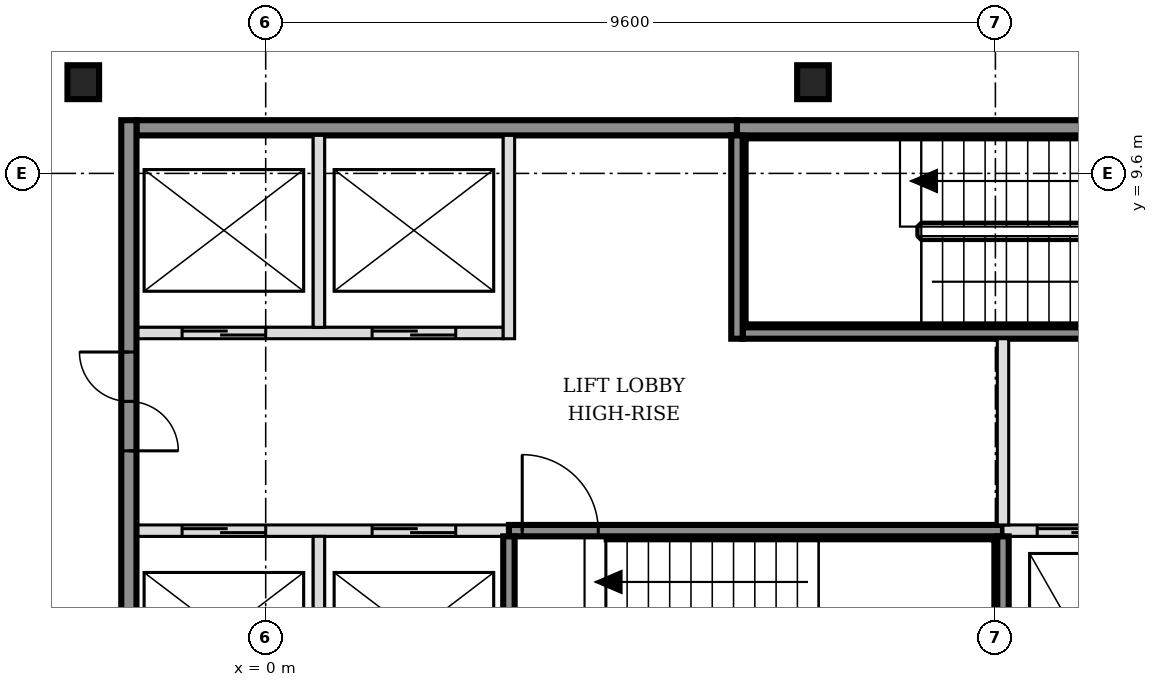
"""IFC4 building model, lengths in metres.
Left out: names, types, materials, properties, quantities, classifications, styles, units other than length and angle.
Written with IfcOpenShell. Run it as: python <this file> out.ifc"""

import sys

from ifc_helpers import new_model, si_unit, direction, frame, frame_2d, origin, origin_2d, place, context, subcontext, project, spatial, rectangle, i_section, extrude, element, fill, save


model = new_model("IFC4")
c1 = context("Model", 3, precision=1e-05, world=origin(), true_north=direction((0.0, 1.0)))
c2 = subcontext(c1, "Body", "Model", "MODEL_VIEW")
j1 = project(units=[si_unit("LENGTHUNIT", "METRE"), si_unit("PLANEANGLEUNIT", "RADIAN")], contexts=[c1])
p1 = place(None, origin())
s1 = spatial("IfcSite", under=j1, at=p1, CompositionType="ELEMENT")
p2 = place(p1, origin())
s2 = spatial("IfcBuilding", under=s1, at=p2, CompositionType="ELEMENT")
p3 = place(p2, frame((0.0, 0.0, 186.6)))
s3 = spatial("IfcBuildingStorey", under=s2, at=p3, CompositionType="ELEMENT", Elevation=186.6)
for number, where, z_axis, x_axis in (
    (1, (-2.4, 10.8, -0.15), (0.0, 0.0, 1.0), (1.0, 0.0, 0.0)),
    (2, (7.2, 10.8, -0.15), (0.0, 0.0, 1.0), (1.0, 0.0, 0.0)),
):
    element("IfcColumn", number, at=place(p3, frame(where, z_axis=z_axis, x_axis=x_axis)), inside=s3, PredefinedType="COLUMN", context=c2, shape_type="SweptSolid", body=[
        extrude(i_section(OverallWidth=0.416, OverallDepth=0.446, WebThickness=0.039, FlangeThickness=0.063, FilletRadius=0.015, at=origin_2d()), origin(), (0.0, 0.0, 1.0), 3.6),
    ])
p4 = place(p3, frame((-1.7, 4.9, 0.0), z_axis=(0.0, 0.0, 1.0), x_axis=(1.0, 0.0, 0.0)))
e3 = element("IfcWall", 3, at=p4, inside=s3, PredefinedType="SOLIDWALL", context=c2, shape_type="SweptSolid", body=[
    extrude(rectangle(XDim=4.9, YDim=0.15, at=frame_2d((2.45, 0.0))), origin(), (0.0, 0.0, 1.0), 3.45),
])
p5 = place(p4, frame((0.6, 0.0, 0.0)))
e4 = element("IfcOpeningElement", 4, at=p5, cuts=e3, PredefinedType="OPENING", context=c2, shape_type="SweptSolid", body=[
    extrude(rectangle(XDim=1.1, YDim=2.1, at=frame_2d((0.55, 1.05))), frame((0.0, 0.085, 0.0), z_axis=(0.0, -1.0, 0.0), x_axis=(1.0, 0.0, 0.0)), (0.0, 0.0, 1.0), 0.17),
])
p6 = place(p4, frame((3.1, 0.0, 0.0)))
e5 = element("IfcOpeningElement", 5, at=p6, cuts=e3, PredefinedType="OPENING", context=c2, shape_type="SweptSolid", body=[
    extrude(rectangle(XDim=1.1, YDim=2.1, at=frame_2d((0.55, 1.05))), frame((0.0, 0.085, 0.0), z_axis=(0.0, -1.0, 0.0), x_axis=(1.0, 0.0, 0.0)), (0.0, 0.0, 1.0), 0.17),
])
p7 = place(p3, frame((3.2, 4.9, 0.0), z_axis=(0.0, 0.0, 1.0), x_axis=(1.0, 0.0, 0.0)))
e6 = element("IfcWall", 6, at=p7, inside=s3, PredefinedType="SOLIDWALL", context=c2, shape_type="SweptSolid", body=[
    extrude(rectangle(XDim=6.5, YDim=0.15, at=frame_2d((3.25, 0.0))), origin(), (0.0, 0.0, 1.0), 3.45),
])
p8 = place(p7, frame((0.175, 0.0, 0.0)))
e7 = element("IfcOpeningElement", 7, at=p8, cuts=e6, PredefinedType="OPENING", context=c2, shape_type="SweptSolid", body=[
    extrude(rectangle(XDim=1.0, YDim=2.1, at=frame_2d((0.5, 1.05))), frame((0.0, 0.085, 0.0), z_axis=(0.0, -1.0, 0.0), x_axis=(1.0, 0.0, 0.0)), (0.0, 0.0, 1.0), 0.17),
])
p9 = place(p3, frame((9.7, 4.9, 0.0), z_axis=(0.0, 0.0, 1.0), x_axis=(1.0, 0.0, 0.0)))
e8 = element("IfcWall", 8, at=p9, inside=s3, PredefinedType="SOLIDWALL", context=c2, shape_type="SweptSolid", body=[
    extrude(rectangle(XDim=6.4, YDim=0.15, at=frame_2d((3.2, 0.0))), origin(), (0.0, 0.0, 1.0), 3.45),
])
p10 = place(p9, frame((0.45, 0.0, 0.0)))
e9 = element("IfcOpeningElement", 9, at=p10, cuts=e8, PredefinedType="OPENING", context=c2, shape_type="SweptSolid", body=[
    extrude(rectangle(XDim=1.0, YDim=2.1, at=frame_2d((0.5, 1.05))), frame((0.0, 0.085, 0.0), z_axis=(0.0, -1.0, 0.0), x_axis=(1.0, 0.0, 0.0)), (0.0, 0.0, 1.0), 0.17),
])
p11 = place(p9, frame((2.35, 0.0, 0.0)))
e10 = element("IfcOpeningElement", 10, at=p11, cuts=e8, PredefinedType="OPENING", context=c2, shape_type="SweptSolid", body=[
    extrude(rectangle(XDim=1.0, YDim=2.1, at=frame_2d((0.5, 1.05))), frame((0.0, 0.085, 0.0), z_axis=(0.0, -1.0, 0.0), x_axis=(1.0, 0.0, 0.0)), (0.0, 0.0, 1.0), 0.17),
])
p12 = place(p9, frame((4.7, 0.0, 0.0)))
e11 = element("IfcOpeningElement", 11, at=p12, cuts=e8, PredefinedType="OPENING", context=c2, shape_type="SweptSolid", body=[
    extrude(rectangle(XDim=0.9, YDim=2.1, at=frame_2d((0.45, 1.05))), frame((0.0, 0.085, 0.0), z_axis=(0.0, -1.0, 0.0), x_axis=(1.0, 0.0, 0.0)), (0.0, 0.0, 1.0), 0.17),
])
p13 = place(p3, frame((-1.7, 7.5, 0.0), z_axis=(0.0, 0.0, 1.0), x_axis=(1.0, 0.0, 0.0)))
e12 = element("IfcWall", 12, at=p13, inside=s3, PredefinedType="SOLIDWALL", context=c2, shape_type="SweptSolid", body=[
    extrude(rectangle(XDim=4.825, YDim=0.15, at=frame_2d((2.413, 0.0))), origin(), (0.0, 0.0, 1.0), 3.45),
])
p14 = place(p13, frame((0.6, 0.0, 0.0)))
e13 = element("IfcOpeningElement", 13, at=p14, cuts=e12, PredefinedType="OPENING", context=c2, shape_type="SweptSolid", body=[
    extrude(rectangle(XDim=1.1, YDim=2.1, at=frame_2d((0.55, 1.05))), frame((0.0, 0.085, 0.0), z_axis=(0.0, -1.0, 0.0), x_axis=(1.0, 0.0, 0.0)), (0.0, 0.0, 1.0), 0.17),
])
p15 = place(p13, frame((3.1, 0.0, 0.0)))
e14 = element("IfcOpeningElement", 14, at=p15, cuts=e12, PredefinedType="OPENING", context=c2, shape_type="SweptSolid", body=[
    extrude(rectangle(XDim=1.1, YDim=2.1, at=frame_2d((0.55, 1.05))), frame((0.0, 0.085, 0.0), z_axis=(0.0, -1.0, 0.0), x_axis=(1.0, 0.0, 0.0)), (0.0, 0.0, 1.0), 0.17),
])
p16 = place(p3, frame((6.275, 7.5, 0.0), z_axis=(0.0, 0.0, 1.0), x_axis=(1.0, 0.0, 0.0)))
e15 = element("IfcWall", 15, at=p16, inside=s3, PredefinedType="SOLIDWALL", context=c2, shape_type="SweptSolid", body=[
    extrude(rectangle(XDim=6.425, YDim=0.15, at=frame_2d((3.212, 0.0))), origin(), (0.0, 0.0, 1.0), 3.45),
])
p17 = place(p16, frame((5.225, 0.0, 0.0)))
e16 = element("IfcOpeningElement", 16, at=p17, cuts=e15, PredefinedType="OPENING", context=c2, shape_type="SweptSolid", body=[
    extrude(rectangle(XDim=1.0, YDim=2.1, at=frame_2d((0.5, 1.05))), frame((0.0, 0.085, 0.0), z_axis=(0.0, -1.0, 0.0), x_axis=(1.0, 0.0, 0.0)), (0.0, 0.0, 1.0), 0.17),
])
p18 = place(p3, frame((-1.7, 10.2, 0.0), z_axis=(0.0, 0.0, 1.0), x_axis=(1.0, 0.0, 0.0)))
e17 = element("IfcWall", 17, at=p18, inside=s3, PredefinedType="SOLIDWALL", context=c2, shape_type="SweptSolid", body=[
    extrude(rectangle(XDim=7.9, YDim=0.2, at=frame_2d((3.95, 0.0))), origin(), (0.0, 0.0, 1.0), 3.45),
])
p19 = place(p3, frame((6.2, 10.2, 0.0), z_axis=(0.0, 0.0, 1.0), x_axis=(1.0, 0.0, 0.0)))
e18 = element("IfcWall", 18, at=p19, inside=s3, PredefinedType="SOLIDWALL", context=c2, shape_type="SweptSolid", body=[
    extrude(rectangle(XDim=6.5, YDim=0.2, at=frame_2d((3.25, 0.0))), origin(), (0.0, 0.0, 1.0), 3.45),
])
p20 = place(p3, frame((-1.8, -5.5, 0.0), z_axis=(0.0, 0.0, 1.0), x_axis=(0.0, 1.0, 0.0)))
e19 = element("IfcWall", 19, at=p20, inside=s3, PredefinedType="SOLIDWALL", context=c2, shape_type="SweptSolid", body=[
    extrude(rectangle(XDim=15.8, YDim=0.2, at=frame_2d((7.9, 0.0))), origin(), (0.0, 0.0, 1.0), 3.45),
])
p21 = place(p20, frame((3.05, 0.0, 0.0)))
e20 = element("IfcOpeningElement", 20, at=p21, cuts=e19, PredefinedType="OPENING", context=c2, shape_type="SweptSolid", body=[
    extrude(rectangle(XDim=1.3, YDim=2.1, at=frame_2d((0.65, 1.05))), frame((0.0, 0.11, 0.0), z_axis=(0.0, -1.0, 0.0), x_axis=(1.0, 0.0, 0.0)), (0.0, 0.0, 1.0), 0.22),
])
p22 = place(p20, frame((11.45, 0.0, 0.0)))
e21 = element("IfcOpeningElement", 21, at=p22, cuts=e19, PredefinedType="OPENING", context=c2, shape_type="SweptSolid", body=[
    extrude(rectangle(XDim=1.3, YDim=2.1, at=frame_2d((0.65, 1.05))), frame((0.0, 0.11, 0.0), z_axis=(0.0, -1.0, 0.0), x_axis=(1.0, 0.0, 0.0)), (0.0, 0.0, 1.0), 0.22),
])
p23 = place(p3, frame((0.7, 2.275, 0.0), z_axis=(0.0, 0.0, 1.0), x_axis=(0.0, 1.0, 0.0)))
e22 = element("IfcWall", 22, at=p23, inside=s3, PredefinedType="SOLIDWALL", context=c2, shape_type="SweptSolid", body=[
    extrude(rectangle(XDim=2.55, YDim=0.15, at=frame_2d((1.275, 0.0))), origin(), (0.0, 0.0, 1.0), 3.45),
])
p24 = place(p3, frame((0.7, 7.575, 0.0), z_axis=(0.0, 0.0, 1.0), x_axis=(0.0, 1.0, 0.0)))
e23 = element("IfcWall", 23, at=p24, inside=s3, PredefinedType="SOLIDWALL", context=c2, shape_type="SweptSolid", body=[
    extrude(rectangle(XDim=2.525, YDim=0.15, at=frame_2d((1.263, 0.0))), origin(), (0.0, 0.0, 1.0), 3.45),
])
p25 = place(p3, frame((3.2, 2.275, 0.0), z_axis=(0.0, 0.0, 1.0), x_axis=(0.0, 1.0, 0.0)))
e24 = element("IfcWall", 24, at=p25, inside=s3, PredefinedType="SOLIDWALL", context=c2, shape_type="SweptSolid", body=[
    extrude(rectangle(XDim=2.55, YDim=0.15, at=frame_2d((1.275, 0.0))), origin(), (0.0, 0.0, 1.0), 3.45),
])
for number, where, z_axis, x_axis in (
    (25, (3.2, 7.425, 0.0), (0.0, 0.0, 1.0), (0.0, 1.0, 0.0)),
    (26, (6.2, 7.425, 0.0), (0.0, 0.0, 1.0), (0.0, 1.0, 0.0)),
):
    element("IfcWall", number, at=place(p3, frame(where, z_axis=z_axis, x_axis=x_axis)), inside=s3, PredefinedType="SOLIDWALL", context=c2, shape_type="SweptSolid", body=[
        extrude(rectangle(XDim=2.675, YDim=0.15, at=frame_2d((1.337, 0.0))), origin(), (0.0, 0.0, 1.0), 3.45),
    ])
p26 = place(p3, frame((9.7, 2.275, 0.0), z_axis=(0.0, 0.0, 1.0), x_axis=(0.0, 1.0, 0.0)))
e27 = element("IfcWall", 27, at=p26, inside=s3, PredefinedType="SOLIDWALL", context=c2, shape_type="SweptSolid", body=[
    extrude(rectangle(XDim=2.55, YDim=0.15, at=frame_2d((1.275, 0.0))), origin(), (0.0, 0.0, 1.0), 3.45),
])
p27 = place(p3, frame((9.7, 4.975, 0.0), z_axis=(0.0, 0.0, 1.0), x_axis=(0.0, 1.0, 0.0)))
e28 = element("IfcWall", 28, at=p27, inside=s3, PredefinedType="SOLIDWALL", context=c2, shape_type="SweptSolid", body=[
    extrude(rectangle(XDim=2.45, YDim=0.15, at=frame_2d((1.225, 0.0))), origin(), (0.0, 0.0, 1.0), 3.45),
])
p28 = place(p5, origin())
e29 = element("IfcDoor", 29, at=p28, inside=s3, OperationType="DOUBLE_DOOR_SLIDING", PredefinedType="DOOR", context=c2, shape_type="SweptSolid", body=[
    extrude(rectangle(XDim=1.1, YDim=2.1, at=frame_2d((0.55, 1.05))), frame((0.0, 0.025, 0.0), z_axis=(0.0, -1.0, 0.0), x_axis=(1.0, 0.0, 0.0)), (0.0, 0.0, 1.0), 0.05),
])
fill(e4, e29)
p29 = place(p6, origin())
e30 = element("IfcDoor", 30, at=p29, inside=s3, OperationType="DOUBLE_DOOR_SLIDING", PredefinedType="DOOR", context=c2, shape_type="SweptSolid", body=[
    extrude(rectangle(XDim=1.1, YDim=2.1, at=frame_2d((0.55, 1.05))), frame((0.0, 0.025, 0.0), z_axis=(0.0, -1.0, 0.0), x_axis=(1.0, 0.0, 0.0)), (0.0, 0.0, 1.0), 0.05),
])
fill(e5, e30)
p30 = place(p14, origin())
e31 = element("IfcDoor", 31, at=p30, inside=s3, OperationType="DOUBLE_DOOR_SLIDING", PredefinedType="DOOR", context=c2, shape_type="SweptSolid", body=[
    extrude(rectangle(XDim=1.1, YDim=2.1, at=frame_2d((0.55, 1.05))), frame((0.0, 0.025, 0.0), z_axis=(0.0, -1.0, 0.0), x_axis=(1.0, 0.0, 0.0)), (0.0, 0.0, 1.0), 0.05),
])
fill(e13, e31)
p31 = place(p15, origin())
e32 = element("IfcDoor", 32, at=p31, inside=s3, OperationType="DOUBLE_DOOR_SLIDING", PredefinedType="DOOR", context=c2, shape_type="SweptSolid", body=[
    extrude(rectangle(XDim=1.1, YDim=2.1, at=frame_2d((0.55, 1.05))), frame((0.0, 0.025, 0.0), z_axis=(0.0, -1.0, 0.0), x_axis=(1.0, 0.0, 0.0)), (0.0, 0.0, 1.0), 0.05),
])
fill(e14, e32)
p32 = place(p10, origin())
e33 = element("IfcDoor", 33, at=p32, inside=s3, OperationType="DOUBLE_DOOR_SLIDING", PredefinedType="DOOR", context=c2, shape_type="SweptSolid", body=[
    extrude(rectangle(XDim=1.0, YDim=2.1, at=frame_2d((0.5, 1.05))), frame((0.0, 0.025, 0.0), z_axis=(0.0, -1.0, 0.0), x_axis=(1.0, 0.0, 0.0)), (0.0, 0.0, 1.0), 0.05),
])
fill(e9, e33)
p33 = place(p8, origin())
e34 = element("IfcDoor", 34, at=p33, inside=s3, OperationType="SINGLE_SWING_LEFT", PredefinedType="DOOR", context=c2, shape_type="SweptSolid", body=[
    extrude(rectangle(XDim=1.0, YDim=2.1, at=frame_2d((0.5, 1.05))), frame((0.0, 0.025, 0.0), z_axis=(0.0, -1.0, 0.0), x_axis=(1.0, 0.0, 0.0)), (0.0, 0.0, 1.0), 0.05),
])
fill(e7, e34)
p34 = place(p22, origin())
e35 = element("IfcDoor", 35, at=p34, inside=s3, OperationType="DOUBLE_DOOR_SINGLE_SWING", PredefinedType="DOOR", context=c2, shape_type="SweptSolid", body=[
    extrude(rectangle(XDim=1.3, YDim=2.1, at=frame_2d((0.65, 1.05))), frame((0.0, 0.025, 0.0), z_axis=(0.0, -1.0, 0.0), x_axis=(1.0, 0.0, 0.0)), (0.0, 0.0, 1.0), 0.05),
])
fill(e21, e35)
save(model, sys.argv[1])
